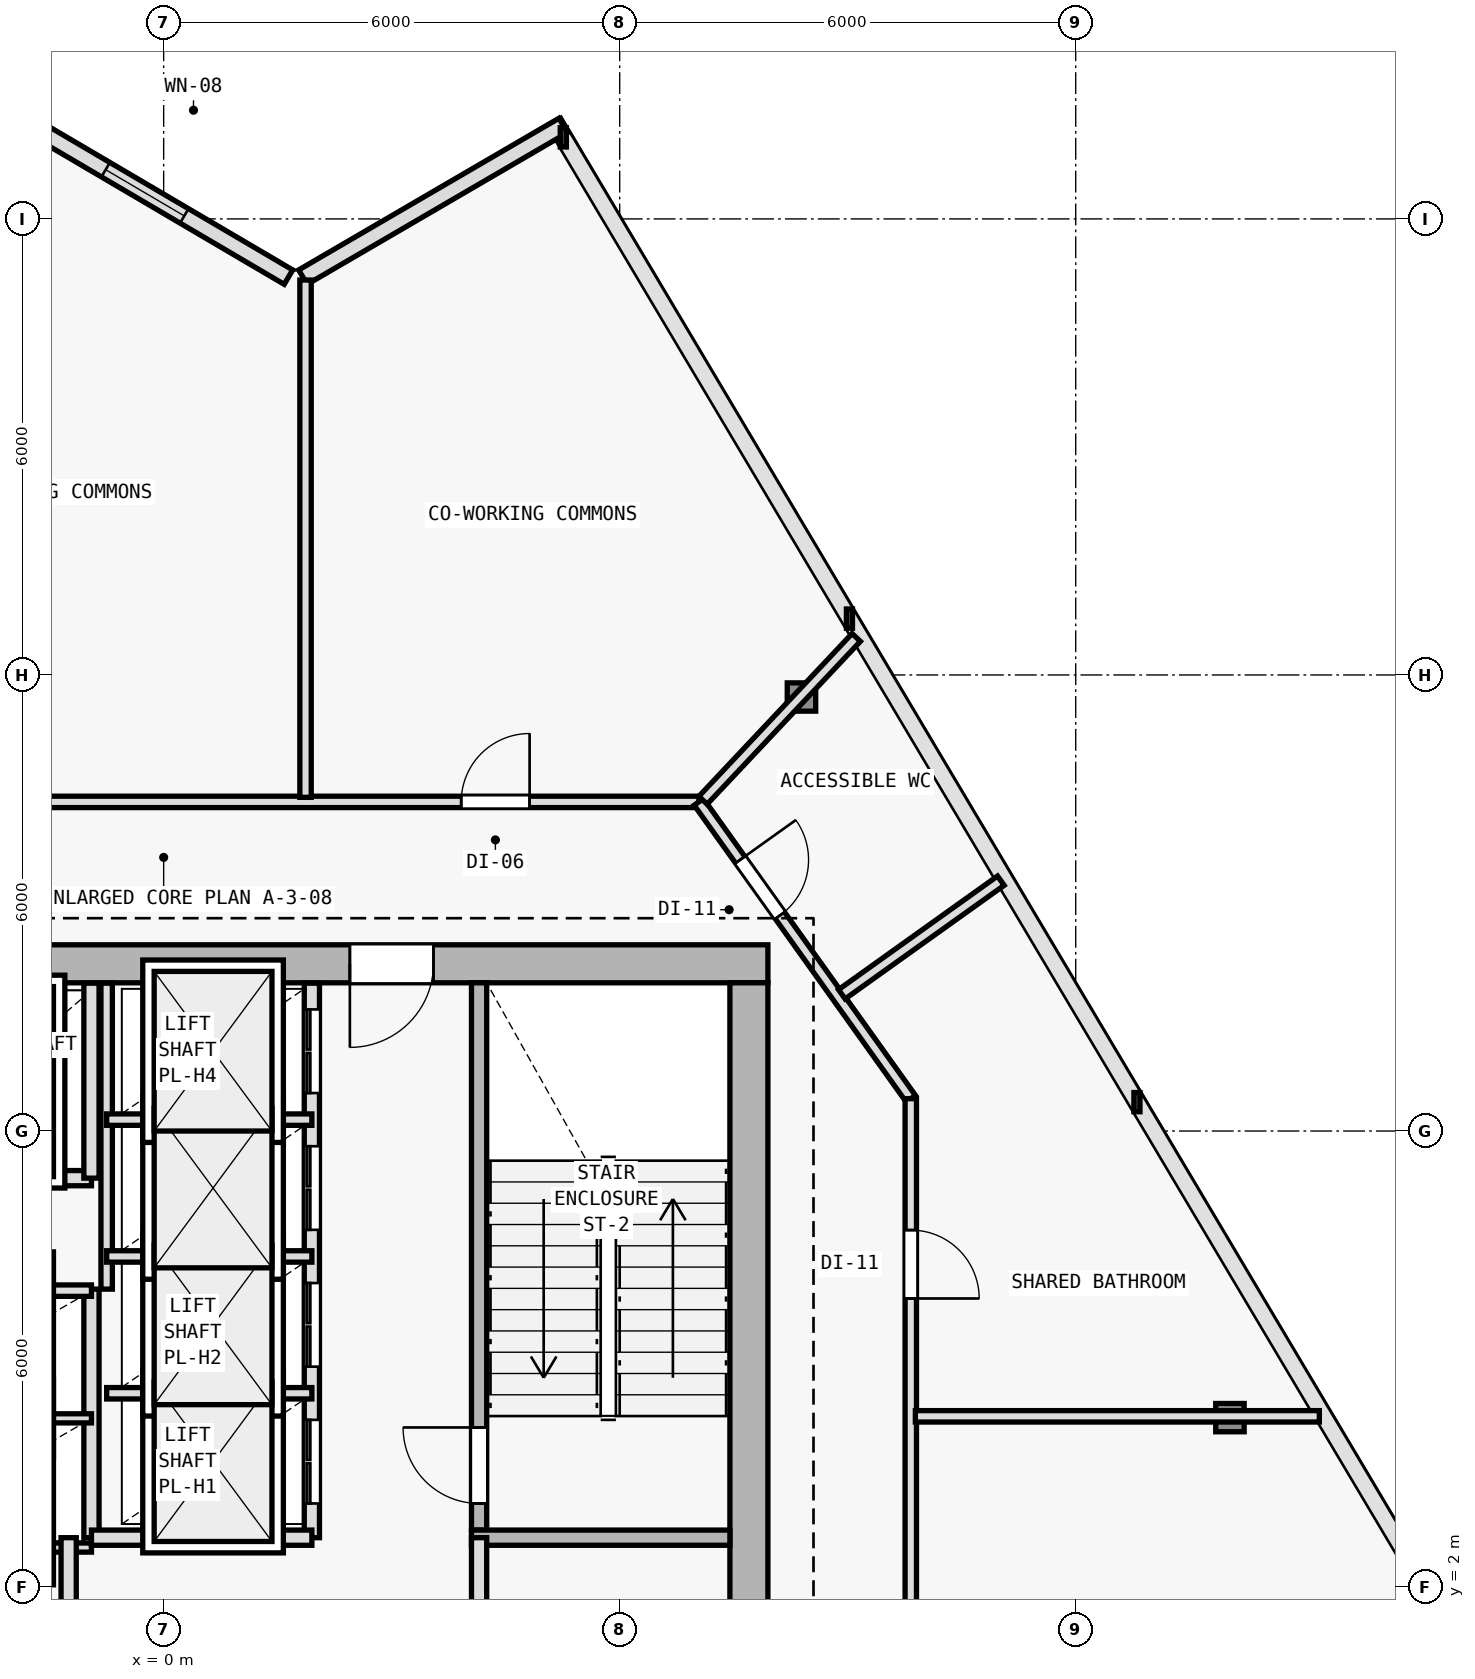
"""IFC4 building model, lengths in metres.
Left out: names, types, materials, properties, quantities, classifications, styles, units other than length and angle.
Written with IfcOpenShell. Run it as: python <this file> out.ifc"""

import sys

from ifc_helpers import new_model, si_unit, direction, frame, frame_2d, origin, origin_2d, place, context, subcontext, project, spatial, rectangle, i_section, extrude, element, fill, save


model = new_model("IFC4")
c1 = context("Model", 3, precision=1e-05, world=origin(), true_north=direction((0.0, 1.0)))
c2 = subcontext(c1, "Body", "Model", "MODEL_VIEW")
j1 = project(units=[si_unit("LENGTHUNIT", "METRE"), si_unit("PLANEANGLEUNIT", "RADIAN")], contexts=[c1])
p1 = place(None, origin())
s1 = spatial("IfcSite", under=j1, at=p1, CompositionType="ELEMENT")
p2 = place(p1, origin())
s2 = spatial("IfcBuilding", under=s1, at=p2, CompositionType="ELEMENT")
p3 = place(p2, frame((0.0, 0.0, 246.3)))
s3 = spatial("IfcBuildingStorey", under=s2, at=p3, CompositionType="ELEMENT", Elevation=246.3)
p4 = place(p3, frame((7.7, 10.2, 0.0), z_axis=(0.0, 0.0, 1.0), x_axis=(1.0, 0.0, 0.0)))
e1 = element("IfcColumn", 1, at=p4, inside=s3, PredefinedType="COLUMN", context=c2, shape_type="SweptSolid", body=[
    extrude(i_section(OverallWidth=0.398, OverallDepth=0.387, WebThickness=0.013, FlangeThickness=0.022, FilletRadius=0.015, at=origin_2d()), origin(), (0.0, 0.0, 1.0), 4.5),
])
p5 = place(p3, frame((14.029, 4.229, 0.005), z_axis=(-0.015117211909, 0.007612984415, 0.999856745925), x_axis=(-0.449781931574, -0.893138406984, 0.0)))
e2 = element("IfcColumn", 2, at=p5, inside=s3, PredefinedType="COLUMN", context=c2, shape_type="SweptSolid", body=[
    extrude(i_section(OverallWidth=0.374, OverallDepth=0.372, WebThickness=0.012, FlangeThickness=0.02, FilletRadius=0.015, at=origin_2d()), origin(), (0.0, 0.0, 1.0), 4.49),
])
p6 = place(p3, frame((8.392, 13.71, 0.005), z_axis=(-0.009354007007, -0.002012199182, 0.999954225756), x_axis=(0.210305364179, -0.977635746993, 0.0)))
e3 = element("IfcColumn", 3, at=p6, inside=s3, PredefinedType="COLUMN", context=c2, shape_type="SweptSolid", body=[
    extrude(i_section(OverallWidth=0.374, OverallDepth=0.372, WebThickness=0.012, FlangeThickness=0.02, FilletRadius=0.015, at=origin_2d()), origin(), (0.0, 0.0, 1.0), 4.489),
])
p7 = place(p3, frame((1.832, 19.234, 0.0), z_axis=(0.0, 0.0, 1.0), x_axis=(0.86397765749, 0.503530145432, 0.0)))
e4 = element("IfcWall", 4, at=p7, inside=s3, PredefinedType="SOLIDWALL", context=c2, shape_type="SweptSolid", body=[
    extrude(rectangle(XDim=3.964, YDim=0.22, at=frame_2d((1.982, 0.0))), origin(), (0.0, 0.0, 1.0), 4.25),
])
p8 = place(p3, frame((-2.134, 21.453, 0.0), z_axis=(0.0, 0.0, 1.0), x_axis=(0.862106131527, -0.506727755292, 0.0)))
e5 = element("IfcWall", 5, at=p8, inside=s3, PredefinedType="SOLIDWALL", context=c2, shape_type="SweptSolid", body=[
    extrude(rectangle(XDim=4.38, YDim=0.22, at=frame_2d((2.19, 0.0))), origin(), (0.0, 0.0, 1.0), 4.25),
])
p9 = place(p8, frame((1.59, 0.0, 0.62)))
e6 = element("IfcOpeningElement", 6, at=p9, cuts=e5, PredefinedType="OPENING", context=c2, shape_type="SweptSolid", body=[
    extrude(rectangle(XDim=1.2, YDim=1.8, at=frame_2d((0.6, 0.9))), frame((0.0, 0.12, 0.0), z_axis=(0.0, -1.0, 0.0), x_axis=(1.0, 0.0, 0.0)), (0.0, 0.0, 1.0), 0.24),
])
p10 = place(p3, frame((7.95, 10.2, 0.0), z_axis=(0.0, 0.0, 1.0), x_axis=(-1.0, 0.0, 0.0)))
e7 = element("IfcWall", 7, at=p10, inside=s3, PredefinedType="SHEAR", context=c2, shape_type="SweptSolid", body=[
    extrude(rectangle(XDim=15.9, YDim=0.5, at=frame_2d((7.95, 0.0))), origin(), (0.0, 0.0, 1.0), 4.25),
])
p11 = place(p10, frame((4.4, 0.0, 0.0)))
e8 = element("IfcOpeningElement", 8, at=p11, cuts=e7, PredefinedType="OPENING", context=c2, shape_type="SweptSolid", body=[
    extrude(rectangle(XDim=1.1, YDim=2.15, at=frame_2d((0.55, 1.075))), frame((0.0, 0.26, 0.0), z_axis=(0.0, -1.0, 0.0), x_axis=(1.0, 0.0, 0.0)), (0.0, 0.0, 1.0), 0.52),
])
p12 = place(p3, frame((7.7, 9.95, 0.0), z_axis=(0.0, 0.0, 1.0), x_axis=(0.0, -1.0, 0.0)))
e9 = element("IfcWall", 9, at=p12, inside=s3, PredefinedType="SHEAR", context=c2, shape_type="SweptSolid", body=[
    extrude(rectangle(XDim=19.1, YDim=0.5, at=frame_2d((9.55, 0.0))), origin(), (0.0, 0.0, 1.0), 4.25),
])
p13 = place(p3, frame((4.15, 2.75, 0.0), z_axis=(0.0, 0.0, 1.0), x_axis=(0.0, 1.0, 0.0)))
e10 = element("IfcWall", 10, at=p13, inside=s3, PredefinedType="SOLIDWALL", context=c2, shape_type="SweptSolid", body=[
    extrude(rectangle(XDim=7.2, YDim=0.2, at=frame_2d((3.6, 0.0))), origin(), (0.0, 0.0, 1.0), 4.25),
])
p14 = place(p13, frame((0.35, 0.0, 0.0)))
e11 = element("IfcOpeningElement", 11, at=p14, cuts=e10, PredefinedType="OPENING", context=c2, shape_type="SweptSolid", body=[
    extrude(rectangle(XDim=1.0, YDim=2.15, at=frame_2d((0.5, 1.075))), frame((0.0, 0.11, 0.0), z_axis=(0.0, -1.0, 0.0), x_axis=(1.0, 0.0, 0.0)), (0.0, 0.0, 1.0), 0.22),
])
p15 = place(p3, frame((4.05, 2.65, 0.0), z_axis=(0.0, 0.0, 1.0), x_axis=(1.0, 0.0, 0.0)))
e12 = element("IfcWall", 12, at=p15, inside=s3, PredefinedType="SOLIDWALL", context=c2, shape_type="SweptSolid", body=[
    extrude(rectangle(XDim=3.4, YDim=0.2, at=frame_2d((1.7, 0.0))), origin(), (0.0, 0.0, 1.0), 4.25),
])
p16 = place(p3, frame((-0.95, 2.65, 0.0), z_axis=(0.0, 0.0, 1.0), x_axis=(0.0, 1.0, 0.0)))
e13 = element("IfcWall", 13, at=p16, inside=s3, PredefinedType="SOLIDWALL", context=c2, shape_type="SweptSolid", body=[
    extrude(rectangle(XDim=3.27, YDim=0.2, at=frame_2d((1.635, 0.0))), origin(), (0.0, 0.0, 1.0), 4.25),
])
for number, where, z_axis, x_axis in (
    (14, (-3.85, 2.52, 0.0), (0.0, 0.0, 1.0), (1.0, 0.0, 0.0)),
    (15, (-3.85, 4.22, 0.0), (0.0, 0.0, 1.0), (1.0, 0.0, 0.0)),
):
    element("IfcWall", number, at=place(p3, frame(where, z_axis=z_axis, x_axis=x_axis)), inside=s3, PredefinedType="PARTITIONING", context=c2, shape_type="SweptSolid", body=[
        extrude(rectangle(XDim=2.9, YDim=0.12, at=frame_2d((1.45, 0.0))), origin(), (0.0, 0.0, 1.0), 4.25),
    ])
p17 = place(p3, frame((-3.85, 5.9, 0.0), z_axis=(0.0, 0.0, 1.0), x_axis=(1.0, 0.0, 0.0)))
e16 = element("IfcWall", 16, at=p17, inside=s3, PredefinedType="PARTITIONING", context=c2, shape_type="SweptSolid", body=[
    extrude(rectangle(XDim=2.9, YDim=0.15, at=frame_2d((1.45, 0.0))), origin(), (0.0, 0.0, 1.0), 4.25),
])
p18 = place(p3, frame((-3.85, 7.38, 0.0), z_axis=(0.0, 0.0, 1.0), x_axis=(1.0, 0.0, 0.0)))
e17 = element("IfcWall", 17, at=p18, inside=s3, PredefinedType="SOLIDWALL", context=c2, shape_type="SweptSolid", body=[
    extrude(rectangle(XDim=2.9, YDim=0.2, at=frame_2d((1.45, 0.0))), origin(), (0.0, 0.0, 1.0), 4.25),
])
p19 = place(p18, frame((0.85, 0.0, 0.0)))
e18 = element("IfcOpeningElement", 18, at=p19, cuts=e17, PredefinedType="OPENING", context=c2, shape_type="SweptSolid", body=[
    extrude(rectangle(XDim=1.2, YDim=2.2, at=frame_2d((0.6, 1.1))), frame((0.0, 0.11, 0.0), z_axis=(0.0, -1.0, 0.0), x_axis=(1.0, 0.0, 0.0)), (0.0, 0.0, 1.0), 0.22),
])
p20 = place(p3, frame((-0.95, 7.38, 0.0), z_axis=(0.0, 0.0, 1.0), x_axis=(0.0, 1.0, 0.0)))
e19 = element("IfcWall", 19, at=p20, inside=s3, PredefinedType="SOLIDWALL", context=c2, shape_type="SweptSolid", body=[
    extrude(rectangle(XDim=2.565, YDim=0.2, at=frame_2d((1.283, 0.0))), origin(), (0.0, 0.0, 1.0), 4.25),
])
p21 = place(p3, frame((4.15, -6.05, 0.0), z_axis=(0.0, 0.0, 1.0), x_axis=(0.0, 1.0, 0.0)))
e20 = element("IfcWall", 20, at=p21, inside=s3, PredefinedType="SOLIDWALL", context=c2, shape_type="SweptSolid", body=[
    extrude(rectangle(XDim=8.7, YDim=0.2, at=frame_2d((4.35, 0.0))), origin(), (0.0, 0.0, 1.0), 4.25),
])
p22 = place(p21, frame((3.6, 0.0, 0.0)))
e21 = element("IfcOpeningElement", 21, at=p22, cuts=e20, PredefinedType="OPENING", context=c2, shape_type="SweptSolid", body=[
    extrude(rectangle(XDim=0.95, YDim=2.1, at=frame_2d((0.475, 1.05))), frame((0.0, 0.11, 0.0), z_axis=(0.0, -1.0, 0.0), x_axis=(1.0, 0.0, 0.0)), (0.0, 0.0, 1.0), 0.22),
])
p23 = place(p3, frame((-1.25, -6.05, 0.0), z_axis=(0.0, 0.0, 1.0), x_axis=(0.0, 1.0, 0.0)))
e22 = element("IfcWall", 22, at=p23, inside=s3, PredefinedType="SOLIDWALL", context=c2, shape_type="SweptSolid", body=[
    extrude(rectangle(XDim=8.7, YDim=0.2, at=frame_2d((4.35, 0.0))), origin(), (0.0, 0.0, 1.0), 4.25),
])
p24 = place(p23, frame((3.4, 0.0, 0.0)))
e23 = element("IfcOpeningElement", 23, at=p24, cuts=e22, PredefinedType="OPENING", context=c2, shape_type="SweptSolid", body=[
    extrude(rectangle(XDim=0.95, YDim=2.1, at=frame_2d((0.475, 1.05))), frame((0.0, 0.11, 0.0), z_axis=(0.0, -1.0, 0.0), x_axis=(1.0, 0.0, 0.0)), (0.0, 0.0, 1.0), 0.22),
])
p25 = place(p3, frame((1.95, 2.65, 0.0), z_axis=(0.0, 0.0, 1.0), x_axis=(0.0, 1.0, 0.0)))
e24 = element("IfcWall", 24, at=p25, inside=s3, PredefinedType="SOLIDWALL", context=c2, shape_type="SweptSolid", body=[
    extrude(rectangle(XDim=7.295, YDim=0.2, at=frame_2d((3.647, 0.0))), origin(), (0.0, 0.0, 1.0), 4.25),
])
p26 = place(p25, frame((0.45, 0.0, 0.0)))
e25 = element("IfcOpeningElement", 25, at=p26, cuts=e24, PredefinedType="OPENING", context=c2, shape_type="SweptSolid", body=[
    extrude(rectangle(XDim=1.1, YDim=2.15, at=frame_2d((0.55, 1.075))), frame((0.0, 0.11, 0.0), z_axis=(0.0, -1.0, 0.0), x_axis=(1.0, 0.0, 0.0)), (0.0, 0.0, 1.0), 0.22),
])
p27 = place(p25, frame((2.25, 0.0, 0.0)))
e26 = element("IfcOpeningElement", 26, at=p27, cuts=e24, PredefinedType="OPENING", context=c2, shape_type="SweptSolid", body=[
    extrude(rectangle(XDim=1.1, YDim=2.15, at=frame_2d((0.55, 1.075))), frame((0.0, 0.11, 0.0), z_axis=(0.0, -1.0, 0.0), x_axis=(1.0, 0.0, 0.0)), (0.0, 0.0, 1.0), 0.22),
])
p28 = place(p25, frame((4.05, 0.0, 0.0)))
e27 = element("IfcOpeningElement", 27, at=p28, cuts=e24, PredefinedType="OPENING", context=c2, shape_type="SweptSolid", body=[
    extrude(rectangle(XDim=1.1, YDim=2.15, at=frame_2d((0.55, 1.075))), frame((0.0, 0.11, 0.0), z_axis=(0.0, -1.0, 0.0), x_axis=(1.0, 0.0, 0.0)), (0.0, 0.0, 1.0), 0.22),
])
p29 = place(p25, frame((5.85, 0.0, 0.0)))
e28 = element("IfcOpeningElement", 28, at=p29, cuts=e24, PredefinedType="OPENING", context=c2, shape_type="SweptSolid", body=[
    extrude(rectangle(XDim=1.1, YDim=2.15, at=frame_2d((0.55, 1.075))), frame((0.0, 0.11, 0.0), z_axis=(0.0, -1.0, 0.0), x_axis=(1.0, 0.0, 0.0)), (0.0, 0.0, 1.0), 0.22),
])
p30 = place(p3, frame((-0.95, 2.65, 0.0), z_axis=(0.0, 0.0, 1.0), x_axis=(1.0, 0.0, 0.0)))
e29 = element("IfcWall", 29, at=p30, inside=s3, PredefinedType="SOLIDWALL", context=c2, shape_type="SweptSolid", body=[
    extrude(rectangle(XDim=2.9, YDim=0.2, at=frame_2d((1.45, 0.0))), origin(), (0.0, 0.0, 1.0), 4.25),
])
p31 = place(p3, frame((-0.75, 5.92, 0.0), z_axis=(0.0, 0.0, 1.0), x_axis=(0.0, 1.0, 0.0)))
e30 = element("IfcWall", 30, at=p31, inside=s3, PredefinedType="PARTITIONING", context=c2, shape_type="SweptSolid", body=[
    extrude(rectangle(XDim=4.025, YDim=0.15, at=frame_2d((2.013, 0.0))), origin(), (0.0, 0.0, 1.0), 4.25),
])
for number, where, z_axis, x_axis in (
    (31, (-0.75, 4.55, 0.0), (0.0, 0.0, 1.0), (1.0, 0.0, 0.0)),
    (32, (-0.75, 6.35, 0.0), (0.0, 0.0, 1.0), (1.0, 0.0, 0.0)),
    (33, (-0.75, 8.15, 0.0), (0.0, 0.0, 1.0), (1.0, 0.0, 0.0)),
):
    element("IfcWall", number, at=place(p3, frame(where, z_axis=z_axis, x_axis=x_axis)), inside=s3, PredefinedType="PARTITIONING", context=c2, shape_type="SweptSolid", body=[
        extrude(rectangle(XDim=2.7, YDim=0.15, at=frame_2d((1.35, 0.0))), origin(), (0.0, 0.0, 1.0), 4.25),
    ])
p32 = place(p3, frame((-7.041, 12.33, 0.0), z_axis=(0.0, 0.0, 1.0), x_axis=(1.0, 0.0, 0.0)))
e34 = element("IfcWall", 34, at=p32, inside=s3, PredefinedType="PARTITIONING", context=c2, shape_type="SweptSolid", body=[
    extrude(rectangle(XDim=14.083, YDim=0.15, at=frame_2d((7.041, 0.0))), origin(), (0.0, 0.0, 1.0), 3.875),
])
p33 = place(p32, frame((10.956, 0.0, 0.0)))
e35 = element("IfcOpeningElement", 35, at=p33, cuts=e34, PredefinedType="OPENING", context=c2, shape_type="SweptSolid", body=[
    extrude(rectangle(XDim=0.9, YDim=2.1, at=frame_2d((0.45, 1.05))), frame((0.0, 0.085, 0.0), z_axis=(0.0, -1.0, 0.0), x_axis=(1.0, 0.0, 0.0)), (0.0, 0.0, 1.0), 0.17),
])
p34 = place(p32, frame((4.471, 0.0, 0.0)))
e36 = element("IfcOpeningElement", 36, at=p34, cuts=e34, PredefinedType="OPENING", context=c2, shape_type="SweptSolid", body=[
    extrude(rectangle(XDim=0.9, YDim=2.1, at=frame_2d((0.45, 1.05))), frame((0.0, 0.085, 0.0), z_axis=(0.0, -1.0, 0.0), x_axis=(1.0, 0.0, 0.0)), (0.0, 0.0, 1.0), 0.17),
])
p35 = place(p3, frame((7.041, 12.33, 0.0), z_axis=(0.0, 0.0, 1.0), x_axis=(0.581218941111, -0.813747222725, 0.0)))
e37 = element("IfcWall", 37, at=p35, inside=s3, PredefinedType="PARTITIONING", context=c2, shape_type="SweptSolid", body=[
    extrude(rectangle(XDim=4.798, YDim=0.15, at=frame_2d((2.399, 0.0))), origin(), (0.0, 0.0, 1.0), 3.625),
])
p36 = place(p35, frame((0.936, 0.0, 0.0)))
e38 = element("IfcOpeningElement", 38, at=p36, cuts=e37, PredefinedType="OPENING", context=c2, shape_type="SweptSolid", body=[
    extrude(rectangle(XDim=0.9, YDim=2.1, at=frame_2d((0.45, 1.05))), frame((0.0, 0.085, 0.0), z_axis=(0.0, -1.0, 0.0), x_axis=(1.0, 0.0, 0.0)), (0.0, 0.0, 1.0), 0.17),
])
p37 = place(p3, frame((9.83, 8.426, 0.0), z_axis=(0.0, 0.0, 1.0), x_axis=(0.0, -1.0, 0.0)))
e39 = element("IfcWall", 39, at=p37, inside=s3, PredefinedType="PARTITIONING", context=c2, shape_type="SweptSolid", body=[
    extrude(rectangle(XDim=19.956, YDim=0.15, at=frame_2d((9.978, 0.0))), origin(), (0.0, 0.0, 1.0), 3.625),
])
p38 = place(p37, frame((11.528, 0.0, 0.0)))
e40 = element("IfcOpeningElement", 40, at=p38, cuts=e39, PredefinedType="OPENING", context=c2, shape_type="SweptSolid", body=[
    extrude(rectangle(XDim=0.9, YDim=2.1, at=frame_2d((0.45, 1.05))), frame((0.0, 0.085, 0.0), z_axis=(0.0, -1.0, 0.0), x_axis=(1.0, 0.0, 0.0)), (0.0, 0.0, 1.0), 0.17),
])
p39 = place(p37, frame((1.729, 0.0, 0.0)))
e41 = element("IfcOpeningElement", 41, at=p39, cuts=e39, PredefinedType="OPENING", context=c2, shape_type="SweptSolid", body=[
    extrude(rectangle(XDim=0.9, YDim=2.1, at=frame_2d((0.45, 1.05))), frame((0.0, 0.085, 0.0), z_axis=(0.0, -1.0, 0.0), x_axis=(1.0, 0.0, 0.0)), (0.0, 0.0, 1.0), 0.17),
])
p40 = place(p3, frame((9.89, 4.247, 0.0), z_axis=(0.0, 0.0, 1.0), x_axis=(1.0, 0.0, 0.0)))
e42 = element("IfcWall", 42, at=p40, inside=s3, PredefinedType="PARTITIONING", context=c2, shape_type="SweptSolid", body=[
    extrude(rectangle(XDim=5.315, YDim=0.15, at=frame_2d((2.658, 0.0))), origin(), (0.0, 0.0, 1.0), 3.625),
])
p41 = place(p3, frame((7.096, 12.351, 0.0), z_axis=(0.0, 0.0, 1.0), x_axis=(0.685325863459, 0.728236541842, 0.0)))
e43 = element("IfcWall", 43, at=p41, inside=s3, PredefinedType="PARTITIONING", context=c2, shape_type="SweptSolid", body=[
    extrude(rectangle(XDim=2.941, YDim=0.15, at=frame_2d((1.471, 0.0))), origin(), (0.0, 0.0, 1.0), 3.875),
])
p42 = place(p3, frame((8.923, 9.799, 0.0), z_axis=(0.0, 0.0, 1.0), x_axis=(0.813720638444, 0.581256159168, 0.0)))
e44 = element("IfcWall", 44, at=p42, inside=s3, PredefinedType="PARTITIONING", context=c2, shape_type="SweptSolid", body=[
    extrude(rectangle(XDim=2.571, YDim=0.15, at=frame_2d((1.286, 0.0))), origin(), (0.0, 0.0, 1.0), 3.875),
])
p43 = place(p3, frame((1.867, 12.39, 0.0), z_axis=(0.0, 0.0, 1.0), x_axis=(0.0, 1.0, 0.0)))
e45 = element("IfcWall", 45, at=p43, inside=s3, PredefinedType="PARTITIONING", context=c2, shape_type="SweptSolid", body=[
    extrude(rectangle(XDim=6.806, YDim=0.15, at=frame_2d((3.403, 0.0))), origin(), (0.0, 0.0, 1.0), 3.875),
])
p44 = place(p9, origin())
e46 = element("IfcWindow", 46, at=p44, inside=s3, PartitioningType="SINGLE_PANEL", PredefinedType="WINDOW", context=c2, shape_type="SweptSolid", body=[
    extrude(rectangle(XDim=1.2, YDim=1.8, at=frame_2d((0.6, 0.9))), frame((0.0, 0.03, 0.0), z_axis=(0.0, -1.0, 0.0), x_axis=(1.0, 0.0, 0.0)), (0.0, 0.0, 1.0), 0.06),
])
fill(e6, e46)
p45 = place(p11, origin())
e47 = element("IfcDoor", 47, at=p45, inside=s3, OperationType="SINGLE_SWING_RIGHT", PredefinedType="DOOR", context=c2, shape_type="SweptSolid", body=[
    extrude(rectangle(XDim=1.1, YDim=2.15, at=frame_2d((0.55, 1.075))), frame((0.0, 0.025, 0.0), z_axis=(0.0, -1.0, 0.0), x_axis=(1.0, 0.0, 0.0)), (0.0, 0.0, 1.0), 0.05),
])
fill(e8, e47)
p46 = place(p14, origin())
e48 = element("IfcDoor", 48, at=p46, inside=s3, OperationType="SINGLE_SWING_RIGHT", PredefinedType="DOOR", context=c2, shape_type="SweptSolid", body=[
    extrude(rectangle(XDim=1.0, YDim=2.15, at=frame_2d((0.5, 1.075))), frame((0.0, 0.025, 0.0), z_axis=(0.0, -1.0, 0.0), x_axis=(1.0, 0.0, 0.0)), (0.0, 0.0, 1.0), 0.05),
])
fill(e11, e48)
p47 = place(p26, origin())
e49 = element("IfcDoor", 49, at=p47, inside=s3, OperationType="DOUBLE_DOOR_SLIDING", PredefinedType="DOOR", context=c2, shape_type="SweptSolid", body=[
    extrude(rectangle(XDim=1.1, YDim=2.15, at=frame_2d((0.55, 1.075))), frame((0.0, 0.025, 0.0), z_axis=(0.0, -1.0, 0.0), x_axis=(1.0, 0.0, 0.0)), (0.0, 0.0, 1.0), 0.05),
])
fill(e25, e49)
p48 = place(p27, origin())
e50 = element("IfcDoor", 50, at=p48, inside=s3, OperationType="DOUBLE_DOOR_SLIDING", PredefinedType="DOOR", context=c2, shape_type="SweptSolid", body=[
    extrude(rectangle(XDim=1.1, YDim=2.15, at=frame_2d((0.55, 1.075))), frame((0.0, 0.025, 0.0), z_axis=(0.0, -1.0, 0.0), x_axis=(1.0, 0.0, 0.0)), (0.0, 0.0, 1.0), 0.05),
])
fill(e26, e50)
p49 = place(p28, origin())
e51 = element("IfcDoor", 51, at=p49, inside=s3, OperationType="DOUBLE_DOOR_SLIDING", PredefinedType="DOOR", context=c2, shape_type="SweptSolid", body=[
    extrude(rectangle(XDim=1.1, YDim=2.15, at=frame_2d((0.55, 1.075))), frame((0.0, 0.025, 0.0), z_axis=(0.0, -1.0, 0.0), x_axis=(1.0, 0.0, 0.0)), (0.0, 0.0, 1.0), 0.05),
])
fill(e27, e51)
p50 = place(p29, origin())
e52 = element("IfcDoor", 52, at=p50, inside=s3, OperationType="DOUBLE_DOOR_SLIDING", PredefinedType="DOOR", context=c2, shape_type="SweptSolid", body=[
    extrude(rectangle(XDim=1.1, YDim=2.15, at=frame_2d((0.55, 1.075))), frame((0.0, 0.025, 0.0), z_axis=(0.0, -1.0, 0.0), x_axis=(1.0, 0.0, 0.0)), (0.0, 0.0, 1.0), 0.05),
])
fill(e28, e52)
p51 = place(p39, origin())
e53 = element("IfcDoor", 53, at=p51, inside=s3, OperationType="SINGLE_SWING_RIGHT", PredefinedType="DOOR", context=c2, shape_type="SweptSolid", body=[
    extrude(rectangle(XDim=0.9, YDim=2.1, at=frame_2d((0.45, 1.05))), frame((0.0, 0.025, 0.0), z_axis=(0.0, -1.0, 0.0), x_axis=(1.0, 0.0, 0.0)), (0.0, 0.0, 1.0), 0.05),
])
fill(e41, e53)
p52 = place(p36, origin())
e54 = element("IfcDoor", 54, at=p52, inside=s3, OperationType="SINGLE_SWING_LEFT", PredefinedType="DOOR", context=c2, shape_type="SweptSolid", body=[
    extrude(rectangle(XDim=0.9, YDim=2.1, at=frame_2d((0.45, 1.05))), frame((0.0, 0.025, 0.0), z_axis=(0.0, -1.0, 0.0), x_axis=(1.0, 0.0, 0.0)), (0.0, 0.0, 1.0), 0.05),
])
fill(e38, e54)
p53 = place(p33, origin())
e55 = element("IfcDoor", 55, at=p53, inside=s3, OperationType="SINGLE_SWING_RIGHT", PredefinedType="DOOR", context=c2, shape_type="SweptSolid", body=[
    extrude(rectangle(XDim=0.9, YDim=2.1, at=frame_2d((0.45, 1.05))), frame((0.0, 0.025, 0.0), z_axis=(0.0, -1.0, 0.0), x_axis=(1.0, 0.0, 0.0)), (0.0, 0.0, 1.0), 0.05),
])
fill(e35, e55)
save(model, sys.argv[1])
